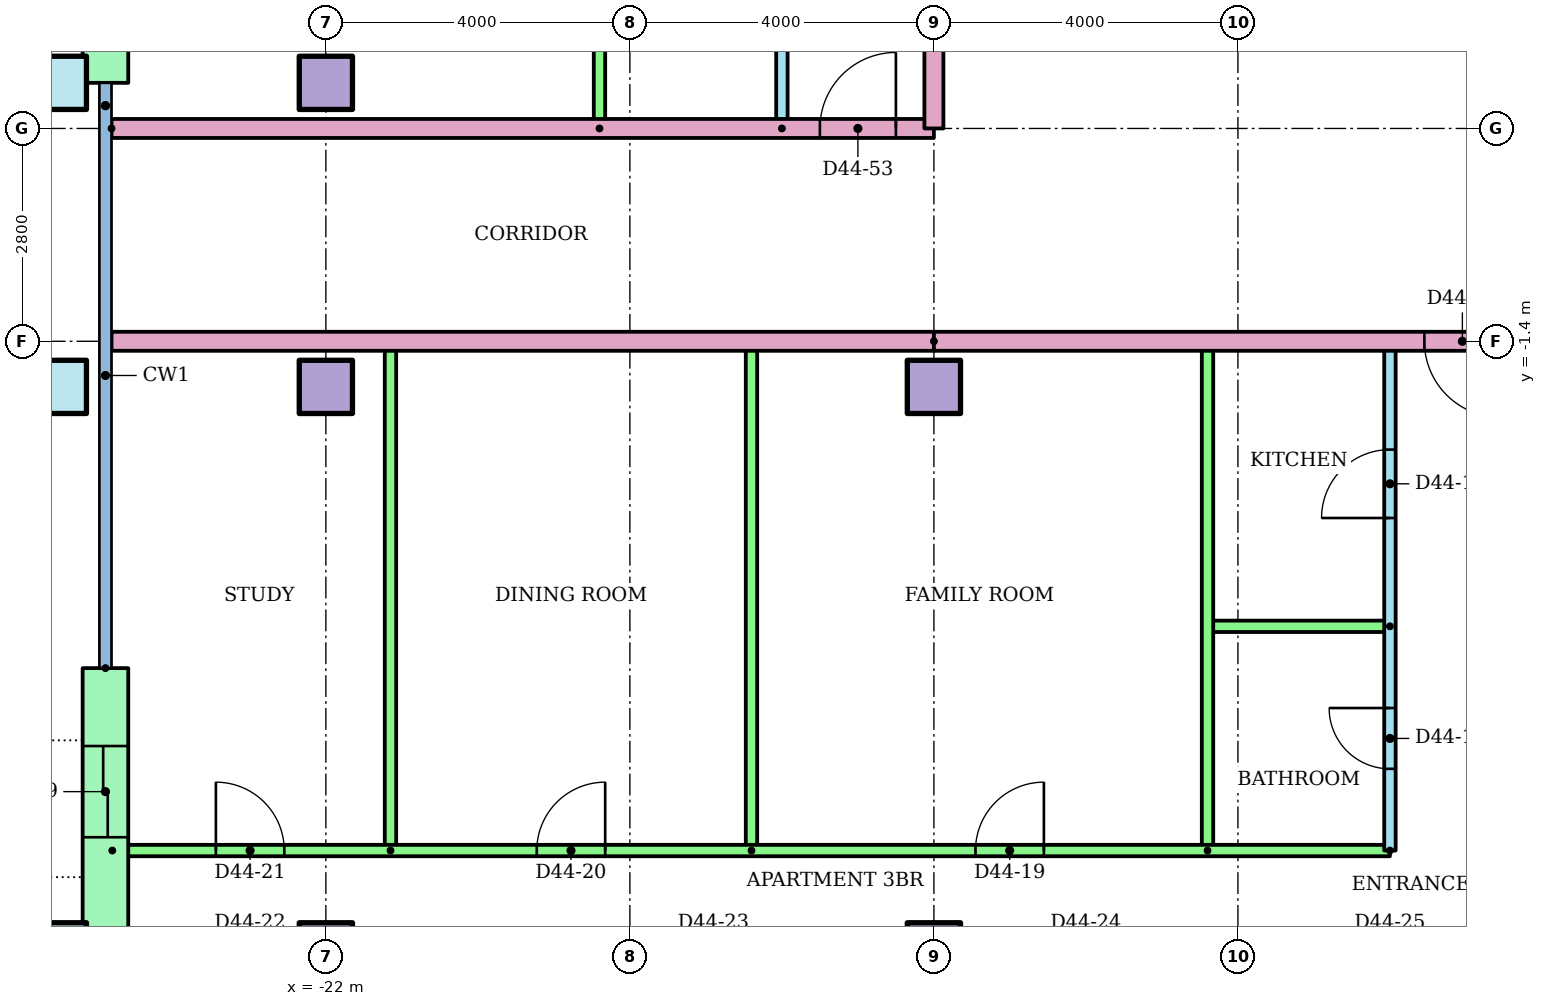
"""IFC4 building model, lengths in metres.
Left out: names, types, materials, properties, quantities, classifications, styles, units other than length and angle.
Written with IfcOpenShell. Run it as: python <this file> out.ifc"""

import sys

from ifc_helpers import new_model, si_unit, direction, frame, frame_2d, origin, origin_2d, place, context, subcontext, project, spatial, rectangle, hollow_rectangle, extrude, element, fill, save


model = new_model("IFC4")
c1 = context("Model", 3, precision=1e-05, world=origin(), true_north=direction((0.0, 1.0)))
c2 = subcontext(c1, "Body", "Model", "MODEL_VIEW")
j1 = project(units=[si_unit("LENGTHUNIT", "METRE"), si_unit("PLANEANGLEUNIT", "RADIAN")], contexts=[c1])
p1 = place(None, origin())
s1 = spatial("IfcSite", under=j1, at=p1, CompositionType="ELEMENT")
p2 = place(p1, origin())
s2 = spatial("IfcBuilding", under=s1, at=p2, CompositionType="ELEMENT")
p3 = place(p2, frame((0.0, 0.0, 171.7)))
s3 = spatial("IfcBuildingStorey", under=s2, at=p3, CompositionType="ELEMENT", Elevation=171.7)
p4 = place(p3, frame((-25.5, -9.4, 0.0)))
e1 = element("IfcColumn", 1, at=p4, inside=s3, PredefinedType="COLUMN", context=c2, shape_type="SweptSolid", body=[
    extrude(hollow_rectangle(XDim=0.7, YDim=0.7, WallThickness=0.036, at=origin_2d()), origin(), (0.0, 0.0, 1.0), 3.2),
])
for number, where in (
    (2, (-22.0, -9.4, 0.0)),
    (3, (-14.0, -9.4, 0.0)),
):
    element("IfcColumn", number, at=place(p3, frame(where)), inside=s3, PredefinedType="COLUMN", context=c2, shape_type="SweptSolid", body=[
        extrude(rectangle(XDim=0.7, YDim=0.7, at=origin_2d()), origin(), (0.0, 0.0, 1.0), 3.2),
    ])
p5 = place(p3, frame((-25.5, -2.0, 0.0)))
e4 = element("IfcColumn", 4, at=p5, inside=s3, PredefinedType="COLUMN", context=c2, shape_type="SweptSolid", body=[
    extrude(hollow_rectangle(XDim=0.7, YDim=0.7, WallThickness=0.036, at=origin_2d()), origin(), (0.0, 0.0, 1.0), 3.2),
])
for number, where in (
    (5, (-22.0, -2.0, 0.0)),
    (6, (-14.0, -2.0, 0.0)),
):
    element("IfcColumn", number, at=place(p3, frame(where)), inside=s3, PredefinedType="COLUMN", context=c2, shape_type="SweptSolid", body=[
        extrude(rectangle(XDim=0.7, YDim=0.7, at=origin_2d()), origin(), (0.0, 0.0, 1.0), 3.2),
    ])
p6 = place(p3, frame((-25.5, 2.0, 0.0)))
e7 = element("IfcColumn", 7, at=p6, inside=s3, PredefinedType="COLUMN", context=c2, shape_type="SweptSolid", body=[
    extrude(hollow_rectangle(XDim=0.7, YDim=0.7, WallThickness=0.036, at=origin_2d()), origin(), (0.0, 0.0, 1.0), 3.2),
])
p7 = place(p3, frame((-22.0, 2.0, 0.0)))
e8 = element("IfcColumn", 8, at=p7, inside=s3, PredefinedType="COLUMN", context=c2, shape_type="SweptSolid", body=[
    extrude(rectangle(XDim=0.7, YDim=0.7, at=origin_2d()), origin(), (0.0, 0.0, 1.0), 3.2),
])
p8 = place(p3, frame((-24.9, 6.5, 0.0), z_axis=(0.0, 0.0, 1.0), x_axis=(0.0, -1.0, 0.0)))
e9 = element("IfcWall", 9, at=p8, inside=s3, PredefinedType="STANDARD", context=c2, shape_type="SweptSolid", body=[
    extrude(rectangle(XDim=4.5, YDim=0.6, at=frame_2d((2.25, 0.0))), origin(), (0.0, 0.0, 1.0), 2.92),
])
p9 = place(p8, frame((1.65, 0.0, 0.0)))
e10 = element("IfcOpeningElement", 10, at=p9, cuts=e9, PredefinedType="OPENING", context=c2, shape_type="SweptSolid", body=[
    extrude(rectangle(XDim=1.2, YDim=2.1, at=frame_2d((0.6, 1.05))), frame((0.0, 0.31, 0.0), z_axis=(0.0, -1.0, 0.0), x_axis=(1.0, 0.0, 0.0)), (0.0, 0.0, 1.0), 0.62),
])
p10 = place(p3, frame((-24.9, -5.7, 0.0), z_axis=(0.0, 0.0, 1.0), x_axis=(0.0, -1.0, 0.0)))
e11 = element("IfcWall", 11, at=p10, inside=s3, PredefinedType="STANDARD", context=c2, shape_type="SweptSolid", body=[
    extrude(rectangle(XDim=3.7, YDim=0.6, at=frame_2d((1.85, 0.0))), origin(), (0.0, 0.0, 1.0), 2.92),
])
p11 = place(p10, frame((1.025, 0.0, 0.0)))
e12 = element("IfcOpeningElement", 12, at=p11, cuts=e11, PredefinedType="OPENING", context=c2, shape_type="SweptSolid", body=[
    extrude(rectangle(XDim=1.2, YDim=2.1, at=frame_2d((0.6, 1.05))), frame((0.0, 0.31, 0.0), z_axis=(0.0, -1.0, 0.0), x_axis=(1.0, 0.0, 0.0)), (0.0, 0.0, 1.0), 0.62),
])
p12 = place(p3, frame((-8.0, -8.1, 0.0), z_axis=(0.0, 0.0, 1.0), x_axis=(0.0, 1.0, 0.0)))
e13 = element("IfcWall", 13, at=p12, inside=s3, PredefinedType="PARTITIONING", context=c2, shape_type="SweptSolid", body=[
    extrude(rectangle(XDim=6.7, YDim=0.15, at=frame_2d((3.35, 0.0))), origin(), (0.0, 0.0, 1.0), 2.4),
])
p13 = place(p12, frame((4.375, 0.0, 0.0)))
e14 = element("IfcOpeningElement", 14, at=p13, cuts=e13, PredefinedType="OPENING", context=c2, shape_type="SweptSolid", body=[
    extrude(rectangle(XDim=0.9, YDim=2.1, at=frame_2d((0.45, 1.05))), frame((0.0, 0.085, 0.0), z_axis=(0.0, -1.0, 0.0), x_axis=(1.0, 0.0, 0.0)), (0.0, 0.0, 1.0), 0.17),
])
p14 = place(p12, frame((1.075, 0.0, 0.0)))
e15 = element("IfcOpeningElement", 15, at=p14, cuts=e13, PredefinedType="OPENING", context=c2, shape_type="SweptSolid", body=[
    extrude(rectangle(XDim=0.8, YDim=2.1, at=frame_2d((0.4, 1.05))), frame((0.0, 0.085, 0.0), z_axis=(0.0, -1.0, 0.0), x_axis=(1.0, 0.0, 0.0)), (0.0, 0.0, 1.0), 0.17),
])
p15 = place(p3, frame((-8.0, -5.15, 0.0), z_axis=(0.0, 0.0, 1.0), x_axis=(-1.0, 0.0, 0.0)))
e16 = element("IfcWall", 16, at=p15, inside=s3, PredefinedType="PARTITIONING", context=c2, shape_type="SweptSolid", body=[
    extrude(rectangle(XDim=2.4, YDim=0.15, at=frame_2d((1.2, 0.0))), origin(), (0.0, 0.0, 1.0), 2.4),
])
for number, where, z_axis, x_axis in (
    (17, (-10.4, -8.1, 0.0), (0.0, 0.0, 1.0), (0.0, 1.0, 0.0)),
    (18, (-16.4, -8.1, 0.0), (0.0, 0.0, 1.0), (0.0, 1.0, 0.0)),
    (19, (-21.15, -8.1, 0.0), (0.0, 0.0, 1.0), (0.0, 1.0, 0.0)),
):
    element("IfcWall", number, at=place(p3, frame(where, z_axis=z_axis, x_axis=x_axis)), inside=s3, PredefinedType="PARTITIONING", context=c2, shape_type="SweptSolid", body=[
        extrude(rectangle(XDim=6.7, YDim=0.15, at=frame_2d((3.35, 0.0))), origin(), (0.0, 0.0, 1.0), 2.4),
    ])
p16 = place(p3, frame((-24.81, -8.1, 0.0)))
e20 = element("IfcWall", 20, at=p16, inside=s3, PredefinedType="PARTITIONING", context=c2, shape_type="SweptSolid", body=[
    extrude(rectangle(XDim=16.81, YDim=0.15, at=frame_2d((8.405, 0.0))), origin(), (0.0, 0.0, 1.0), 2.4),
])
p17 = place(p16, frame((11.357, 0.0, 0.0)))
e21 = element("IfcOpeningElement", 21, at=p17, cuts=e20, PredefinedType="OPENING", context=c2, shape_type="SweptSolid", body=[
    extrude(rectangle(XDim=0.9, YDim=2.1, at=frame_2d((0.45, 1.05))), frame((0.0, 0.085, 0.0), z_axis=(0.0, -1.0, 0.0), x_axis=(1.0, 0.0, 0.0)), (0.0, 0.0, 1.0), 0.17),
])
p18 = place(p16, frame((5.585, 0.0, 0.0)))
e22 = element("IfcOpeningElement", 22, at=p18, cuts=e20, PredefinedType="OPENING", context=c2, shape_type="SweptSolid", body=[
    extrude(rectangle(XDim=0.9, YDim=2.1, at=frame_2d((0.45, 1.05))), frame((0.0, 0.085, 0.0), z_axis=(0.0, -1.0, 0.0), x_axis=(1.0, 0.0, 0.0)), (0.0, 0.0, 1.0), 0.17),
])
p19 = place(p16, frame((1.363, 0.0, 0.0)))
e23 = element("IfcOpeningElement", 23, at=p19, cuts=e20, PredefinedType="OPENING", context=c2, shape_type="SweptSolid", body=[
    extrude(rectangle(XDim=0.9, YDim=2.1, at=frame_2d((0.45, 1.05))), frame((0.0, 0.085, 0.0), z_axis=(0.0, -1.0, 0.0), x_axis=(1.0, 0.0, 0.0)), (0.0, 0.0, 1.0), 0.17),
])
p20 = place(p3, frame((-14.0, -1.4, 0.0), z_axis=(0.0, 0.0, 1.0), x_axis=(-1.0, 0.0, 0.0)))
e24 = element("IfcWall", 24, at=p20, inside=s3, PredefinedType="PARTITIONING", context=c2, shape_type="SweptSolid", body=[
    extrude(rectangle(XDim=10.82, YDim=0.25, at=frame_2d((5.41, 0.0))), origin(), (0.0, 0.0, 1.0), 2.4),
])
p21 = place(p3, frame((-16.0, 1.4, 0.0), z_axis=(0.0, 0.0, 1.0), x_axis=(0.0, 1.0, 0.0)))
e25 = element("IfcWall", 25, at=p21, inside=s3, PredefinedType="PARTITIONING", context=c2, shape_type="SweptSolid", body=[
    extrude(rectangle(XDim=9.1, YDim=0.15, at=frame_2d((4.55, 0.0))), origin(), (0.0, 0.0, 1.0), 2.4),
])
p22 = place(p21, frame((2.05, 0.0, 0.0)))
e26 = element("IfcOpeningElement", 26, at=p22, cuts=e25, PredefinedType="OPENING", context=c2, shape_type="SweptSolid", body=[
    extrude(rectangle(XDim=0.9, YDim=2.1, at=frame_2d((0.45, 1.05))), frame((0.0, 0.085, 0.0), z_axis=(0.0, -1.0, 0.0), x_axis=(1.0, 0.0, 0.0)), (0.0, 0.0, 1.0), 0.17),
])
p23 = place(p21, frame((6.65, 0.0, 0.0)))
e27 = element("IfcOpeningElement", 27, at=p23, cuts=e25, PredefinedType="OPENING", context=c2, shape_type="SweptSolid", body=[
    extrude(rectangle(XDim=0.8, YDim=2.1, at=frame_2d((0.4, 1.05))), frame((0.0, 0.085, 0.0), z_axis=(0.0, -1.0, 0.0), x_axis=(1.0, 0.0, 0.0)), (0.0, 0.0, 1.0), 0.17),
])
p24 = place(p3, frame((-18.4, 1.4, 0.0), z_axis=(0.0, 0.0, 1.0), x_axis=(0.0, 1.0, 0.0)))
e28 = element("IfcWall", 28, at=p24, inside=s3, PredefinedType="PARTITIONING", context=c2, shape_type="SweptSolid", body=[
    extrude(rectangle(XDim=9.1, YDim=0.15, at=frame_2d((4.55, 0.0))), origin(), (0.0, 0.0, 1.0), 2.4),
])
p25 = place(p3, frame((-24.82, 1.4, 0.0)))
e29 = element("IfcWall", 29, at=p25, inside=s3, PredefinedType="PARTITIONING", context=c2, shape_type="SweptSolid", body=[
    extrude(rectangle(XDim=10.82, YDim=0.25, at=frame_2d((5.41, 0.0))), origin(), (0.0, 0.0, 1.0), 2.4),
])
p26 = place(p25, frame((9.32, 0.0, 0.0)))
e30 = element("IfcOpeningElement", 30, at=p26, cuts=e29, PredefinedType="OPENING", context=c2, shape_type="SweptSolid", body=[
    extrude(rectangle(XDim=1.0, YDim=2.1, at=frame_2d((0.5, 1.05))), frame((0.0, 0.135, 0.0), z_axis=(0.0, -1.0, 0.0), x_axis=(1.0, 0.0, 0.0)), (0.0, 0.0, 1.0), 0.27),
])
p27 = place(p3, frame((14.0, -1.4, 0.0), z_axis=(0.0, 0.0, 1.0), x_axis=(-1.0, 0.0, 0.0)))
e31 = element("IfcWall", 31, at=p27, inside=s3, PredefinedType="PARTITIONING", context=c2, shape_type="SweptSolid", body=[
    extrude(rectangle(XDim=28.0, YDim=0.25, at=frame_2d((14.0, 0.0))), origin(), (0.0, 0.0, 1.0), 2.4),
])
p28 = place(p27, frame((20.547, 0.0, 0.0)))
e32 = element("IfcOpeningElement", 32, at=p28, cuts=e31, PredefinedType="OPENING", context=c2, shape_type="SweptSolid", body=[
    extrude(rectangle(XDim=1.0, YDim=2.1, at=frame_2d((0.5, 1.05))), frame((0.0, 0.135, 0.0), z_axis=(0.0, -1.0, 0.0), x_axis=(1.0, 0.0, 0.0)), (0.0, 0.0, 1.0), 0.27),
])
p29 = place(p27, frame((18.453, 0.0, 0.0)))
e33 = element("IfcOpeningElement", 33, at=p29, cuts=e31, PredefinedType="OPENING", context=c2, shape_type="SweptSolid", body=[
    extrude(rectangle(XDim=1.0, YDim=2.1, at=frame_2d((0.5, 1.05))), frame((0.0, 0.135, 0.0), z_axis=(0.0, -1.0, 0.0), x_axis=(1.0, 0.0, 0.0)), (0.0, 0.0, 1.0), 0.27),
])
p30 = place(p27, frame((2.453, 0.0, 0.0)))
e34 = element("IfcOpeningElement", 34, at=p30, cuts=e31, PredefinedType="OPENING", context=c2, shape_type="SweptSolid", body=[
    extrude(rectangle(XDim=1.0, YDim=2.1, at=frame_2d((0.5, 1.05))), frame((0.0, 0.135, 0.0), z_axis=(0.0, -1.0, 0.0), x_axis=(1.0, 0.0, 0.0)), (0.0, 0.0, 1.0), 0.27),
])
p31 = place(p3, frame((-14.0, 3.0, 0.0), z_axis=(0.0, 0.0, 1.0), x_axis=(0.0, -1.0, 0.0)))
e35 = element("IfcWall", 35, at=p31, inside=s3, PredefinedType="PARTITIONING", context=c2, shape_type="SweptSolid", body=[
    extrude(rectangle(XDim=1.6, YDim=0.25, at=frame_2d((0.8, 0.0))), origin(), (0.0, 0.0, 1.0), 2.4),
])
p32 = place(p13, origin())
e36 = element("IfcDoor", 36, at=p32, inside=s3, OperationType="SINGLE_SWING_LEFT", PredefinedType="DOOR", context=c2, shape_type="SweptSolid", body=[
    extrude(rectangle(XDim=0.9, YDim=2.1, at=frame_2d((0.45, 1.05))), frame((0.0, 0.025, 0.0), z_axis=(0.0, -1.0, 0.0), x_axis=(1.0, 0.0, 0.0)), (0.0, 0.0, 1.0), 0.05),
])
fill(e14, e36)
p33 = place(p14, origin())
e37 = element("IfcDoor", 37, at=p33, inside=s3, OperationType="SINGLE_SWING_RIGHT", PredefinedType="DOOR", context=c2, shape_type="SweptSolid", body=[
    extrude(rectangle(XDim=0.8, YDim=2.1, at=frame_2d((0.4, 1.05))), frame((0.0, 0.025, 0.0), z_axis=(0.0, -1.0, 0.0), x_axis=(1.0, 0.0, 0.0)), (0.0, 0.0, 1.0), 0.05),
])
fill(e15, e37)
p34 = place(p17, origin())
e38 = element("IfcDoor", 38, at=p34, inside=s3, OperationType="SINGLE_SWING_RIGHT", PredefinedType="DOOR", context=c2, shape_type="SweptSolid", body=[
    extrude(rectangle(XDim=0.9, YDim=2.1, at=frame_2d((0.45, 1.05))), frame((0.0, 0.025, 0.0), z_axis=(0.0, -1.0, 0.0), x_axis=(1.0, 0.0, 0.0)), (0.0, 0.0, 1.0), 0.05),
])
fill(e21, e38)
p35 = place(p18, origin())
e39 = element("IfcDoor", 39, at=p35, inside=s3, OperationType="SINGLE_SWING_RIGHT", PredefinedType="DOOR", context=c2, shape_type="SweptSolid", body=[
    extrude(rectangle(XDim=0.9, YDim=2.1, at=frame_2d((0.45, 1.05))), frame((0.0, 0.025, 0.0), z_axis=(0.0, -1.0, 0.0), x_axis=(1.0, 0.0, 0.0)), (0.0, 0.0, 1.0), 0.05),
])
fill(e22, e39)
p36 = place(p19, origin())
e40 = element("IfcDoor", 40, at=p36, inside=s3, OperationType="SINGLE_SWING_LEFT", PredefinedType="DOOR", context=c2, shape_type="SweptSolid", body=[
    extrude(rectangle(XDim=0.9, YDim=2.1, at=frame_2d((0.45, 1.05))), frame((0.0, 0.025, 0.0), z_axis=(0.0, -1.0, 0.0), x_axis=(1.0, 0.0, 0.0)), (0.0, 0.0, 1.0), 0.05),
])
fill(e23, e40)
p37 = place(p28, origin())
e41 = element("IfcDoor", 41, at=p37, inside=s3, OperationType="SINGLE_SWING_LEFT", PredefinedType="DOOR", context=c2, shape_type="SweptSolid", body=[
    extrude(rectangle(XDim=1.0, YDim=2.1, at=frame_2d((0.5, 1.05))), frame((0.0, 0.025, 0.0), z_axis=(0.0, -1.0, 0.0), x_axis=(1.0, 0.0, 0.0)), (0.0, 0.0, 1.0), 0.05),
])
fill(e32, e41)
p38 = place(p26, origin())
e42 = element("IfcDoor", 42, at=p38, inside=s3, OperationType="SINGLE_SWING_RIGHT", PredefinedType="DOOR", context=c2, shape_type="SweptSolid", body=[
    extrude(rectangle(XDim=1.0, YDim=2.1, at=frame_2d((0.5, 1.05))), frame((0.0, 0.025, 0.0), z_axis=(0.0, -1.0, 0.0), x_axis=(1.0, 0.0, 0.0)), (0.0, 0.0, 1.0), 0.05),
])
fill(e30, e42)
p39 = place(p11, origin())
e43 = element("IfcDoor", 43, at=p39, inside=s3, OperationType="SLIDING_TO_LEFT", PredefinedType="DOOR", context=c2, shape_type="SweptSolid", body=[
    extrude(rectangle(XDim=1.2, YDim=2.1, at=frame_2d((0.6, 1.05))), frame((0.0, 0.025, 0.0), z_axis=(0.0, -1.0, 0.0), x_axis=(1.0, 0.0, 0.0)), (0.0, 0.0, 1.0), 0.05),
])
fill(e12, e43)
save(model, sys.argv[1])
